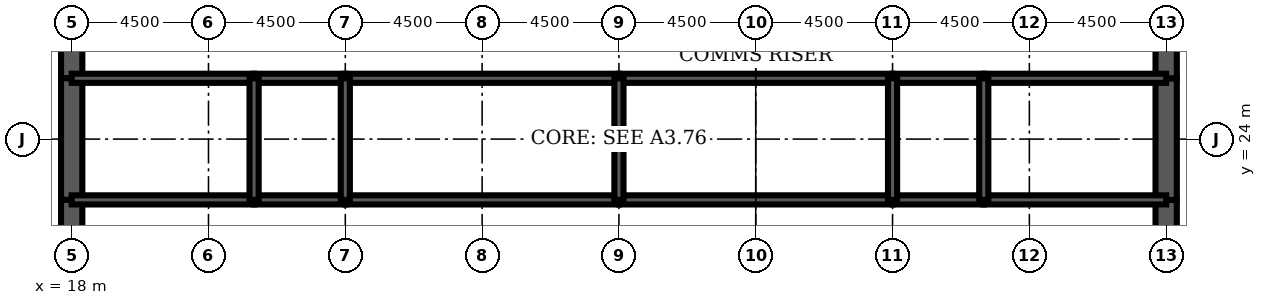
"""IFC4 building model, lengths in metres.
Left out: names, types, materials, properties, quantities, classifications, styles, units other than length and angle.
Written with IfcOpenShell. Run it as: python <this file> out.ifc"""

import sys

from ifc_helpers import new_model, si_unit, direction, frame, frame_2d, origin, place, context, subcontext, project, spatial, rectangle, extrude, element, fill, save


model = new_model("IFC4")
c1 = context("Model", 3, precision=1e-05, world=origin(), true_north=direction((0.0, 1.0)))
c2 = subcontext(c1, "Body", "Model", "MODEL_VIEW")
j1 = project(units=[si_unit("LENGTHUNIT", "METRE"), si_unit("PLANEANGLEUNIT", "RADIAN")], contexts=[c1])
p1 = place(None, origin())
s1 = spatial("IfcSite", under=j1, at=p1, CompositionType="ELEMENT")
p2 = place(p1, origin())
s2 = spatial("IfcBuilding", under=s1, at=p2, CompositionType="ELEMENT")
p3 = place(p2, frame((0.0, 0.0, 325.7)))
s3 = spatial("IfcBuildingStorey", under=s2, at=p3, CompositionType="ELEMENT", Elevation=325.7)
p4 = place(p3, frame((18.0, 28.8, 0.0), z_axis=(0.0, 0.0, 1.0), x_axis=(0.0, -1.0, 0.0)))
e1 = element("IfcWall", 1, at=p4, inside=s3, PredefinedType="SHEAR", context=c2, shape_type="SweptSolid", body=[
    extrude(rectangle(XDim=2.8, YDim=0.7, at=frame_2d((1.4, 0.0))), origin(), (0.0, 0.0, 1.0), 4.2),
])
p5 = place(p4, frame((0.4, 0.0, 0.0)))
e2 = element("IfcOpeningElement", 2, at=p5, cuts=e1, PredefinedType="OPENING", context=c2, shape_type="SweptSolid", body=[
    extrude(rectangle(XDim=1.8, YDim=2.1, at=frame_2d((0.9, 1.05))), frame((0.0, 0.36, 0.0), z_axis=(0.0, -1.0, 0.0), x_axis=(1.0, 0.0, 0.0)), (0.0, 0.0, 1.0), 0.72),
])
p6 = place(p3, frame((18.0, 26.0, 0.0), z_axis=(0.0, 0.0, 1.0), x_axis=(0.0, -1.0, 0.0)))
e3 = element("IfcWall", 3, at=p6, inside=s3, PredefinedType="SHEAR", context=c2, shape_type="SweptSolid", body=[
    extrude(rectangle(XDim=4.0, YDim=0.7, at=frame_2d((2.0, 0.0))), origin(), (0.0, 0.0, 1.0), 4.2),
])
p7 = place(p3, frame((18.0, 22.0, 0.0), z_axis=(0.0, 0.0, 1.0), x_axis=(0.0, -1.0, 0.0)))
e4 = element("IfcWall", 4, at=p7, inside=s3, PredefinedType="SHEAR", context=c2, shape_type="SweptSolid", body=[
    extrude(rectangle(XDim=2.8, YDim=0.7, at=frame_2d((1.4, 0.0))), origin(), (0.0, 0.0, 1.0), 4.2),
])
p8 = place(p7, frame((0.6, 0.0, 0.0)))
e5 = element("IfcOpeningElement", 5, at=p8, cuts=e4, PredefinedType="OPENING", context=c2, shape_type="SweptSolid", body=[
    extrude(rectangle(XDim=1.8, YDim=2.1, at=frame_2d((0.9, 1.05))), frame((0.0, 0.36, 0.0), z_axis=(0.0, -1.0, 0.0), x_axis=(1.0, 0.0, 0.0)), (0.0, 0.0, 1.0), 0.72),
])
p9 = place(p3, frame((54.0, 19.2, 0.0), z_axis=(0.0, 0.0, 1.0), x_axis=(0.0, 1.0, 0.0)))
e6 = element("IfcWall", 6, at=p9, inside=s3, PredefinedType="SHEAR", context=c2, shape_type="SweptSolid", body=[
    extrude(rectangle(XDim=2.8, YDim=0.7, at=frame_2d((1.4, 0.0))), origin(), (0.0, 0.0, 1.0), 4.2),
])
p10 = place(p9, frame((0.4, 0.0, 0.0)))
e7 = element("IfcOpeningElement", 7, at=p10, cuts=e6, PredefinedType="OPENING", context=c2, shape_type="SweptSolid", body=[
    extrude(rectangle(XDim=1.8, YDim=2.1, at=frame_2d((0.9, 1.05))), frame((0.0, 0.36, 0.0), z_axis=(0.0, -1.0, 0.0), x_axis=(1.0, 0.0, 0.0)), (0.0, 0.0, 1.0), 0.72),
])
p11 = place(p3, frame((54.0, 22.0, 0.0), z_axis=(0.0, 0.0, 1.0), x_axis=(0.0, 1.0, 0.0)))
e8 = element("IfcWall", 8, at=p11, inside=s3, PredefinedType="SHEAR", context=c2, shape_type="SweptSolid", body=[
    extrude(rectangle(XDim=4.0, YDim=0.7, at=frame_2d((2.0, 0.0))), origin(), (0.0, 0.0, 1.0), 4.2),
])
p12 = place(p3, frame((54.0, 26.0, 0.0), z_axis=(0.0, 0.0, 1.0), x_axis=(0.0, 1.0, 0.0)))
e9 = element("IfcWall", 9, at=p12, inside=s3, PredefinedType="SHEAR", context=c2, shape_type="SweptSolid", body=[
    extrude(rectangle(XDim=2.8, YDim=0.7, at=frame_2d((1.4, 0.0))), origin(), (0.0, 0.0, 1.0), 4.2),
])
p13 = place(p12, frame((0.6, 0.0, 0.0)))
e10 = element("IfcOpeningElement", 10, at=p13, cuts=e9, PredefinedType="OPENING", context=c2, shape_type="SweptSolid", body=[
    extrude(rectangle(XDim=1.8, YDim=2.1, at=frame_2d((0.9, 1.05))), frame((0.0, 0.36, 0.0), z_axis=(0.0, -1.0, 0.0), x_axis=(1.0, 0.0, 0.0)), (0.0, 0.0, 1.0), 0.72),
])
p14 = place(p3, frame((18.0, 22.0, 0.0), z_axis=(0.0, 0.0, 1.0), x_axis=(1.0, 0.0, 0.0)))
e11 = element("IfcWall", 11, at=p14, inside=s3, PredefinedType="SOLIDWALL", context=c2, shape_type="SweptSolid", body=[
    extrude(rectangle(XDim=6.0, YDim=0.3, at=frame_2d((3.0, 0.0))), origin(), (0.0, 0.0, 1.0), 4.2),
])
p15 = place(p14, frame((4.4, 0.0, 0.0)))
e12 = element("IfcOpeningElement", 12, at=p15, cuts=e11, PredefinedType="OPENING", context=c2, shape_type="SweptSolid", body=[
    extrude(rectangle(XDim=1.0, YDim=2.1, at=frame_2d((0.5, 1.05))), frame((0.0, 0.16, 0.0), z_axis=(0.0, -1.0, 0.0), x_axis=(1.0, 0.0, 0.0)), (0.0, 0.0, 1.0), 0.32),
])
p16 = place(p14, frame((0.75, 0.0, 0.0)))
e13 = element("IfcOpeningElement", 13, at=p16, cuts=e11, PredefinedType="OPENING", context=c2, shape_type="SweptSolid", body=[
    extrude(rectangle(XDim=1.0, YDim=2.1, at=frame_2d((0.5, 1.05))), frame((0.0, 0.16, 0.0), z_axis=(0.0, -1.0, 0.0), x_axis=(1.0, 0.0, 0.0)), (0.0, 0.0, 1.0), 0.32),
])
p17 = place(p3, frame((24.0, 22.0, 0.0), z_axis=(0.0, 0.0, 1.0), x_axis=(1.0, 0.0, 0.0)))
e14 = element("IfcWall", 14, at=p17, inside=s3, PredefinedType="SOLIDWALL", context=c2, shape_type="SweptSolid", body=[
    extrude(rectangle(XDim=3.0, YDim=0.3, at=frame_2d((1.5, 0.0))), origin(), (0.0, 0.0, 1.0), 4.2),
])
p18 = place(p17, frame((1.0, 0.0, 0.0)))
e15 = element("IfcOpeningElement", 15, at=p18, cuts=e14, PredefinedType="OPENING", context=c2, shape_type="SweptSolid", body=[
    extrude(rectangle(XDim=1.0, YDim=2.1, at=frame_2d((0.5, 1.05))), frame((0.0, 0.16, 0.0), z_axis=(0.0, -1.0, 0.0), x_axis=(1.0, 0.0, 0.0)), (0.0, 0.0, 1.0), 0.32),
])
p19 = place(p3, frame((27.0, 22.0, 0.0), z_axis=(0.0, 0.0, 1.0), x_axis=(1.0, 0.0, 0.0)))
e16 = element("IfcWall", 16, at=p19, inside=s3, PredefinedType="SOLIDWALL", context=c2, shape_type="SweptSolid", body=[
    extrude(rectangle(XDim=9.0, YDim=0.3, at=frame_2d((4.5, 0.0))), origin(), (0.0, 0.0, 1.0), 4.2),
])
p20 = place(p19, frame((4.0, 0.0, 0.0)))
e17 = element("IfcOpeningElement", 17, at=p20, cuts=e16, PredefinedType="OPENING", context=c2, shape_type="SweptSolid", body=[
    extrude(rectangle(XDim=1.0, YDim=2.1, at=frame_2d((0.5, 1.05))), frame((0.0, 0.16, 0.0), z_axis=(0.0, -1.0, 0.0), x_axis=(1.0, 0.0, 0.0)), (0.0, 0.0, 1.0), 0.32),
])
p21 = place(p3, frame((36.0, 22.0, 0.0), z_axis=(0.0, 0.0, 1.0), x_axis=(1.0, 0.0, 0.0)))
e18 = element("IfcWall", 18, at=p21, inside=s3, PredefinedType="SOLIDWALL", context=c2, shape_type="SweptSolid", body=[
    extrude(rectangle(XDim=9.0, YDim=0.3, at=frame_2d((4.5, 0.0))), origin(), (0.0, 0.0, 1.0), 4.2),
])
p22 = place(p21, frame((4.0, 0.0, 0.0)))
e19 = element("IfcOpeningElement", 19, at=p22, cuts=e18, PredefinedType="OPENING", context=c2, shape_type="SweptSolid", body=[
    extrude(rectangle(XDim=1.0, YDim=2.1, at=frame_2d((0.5, 1.05))), frame((0.0, 0.16, 0.0), z_axis=(0.0, -1.0, 0.0), x_axis=(1.0, 0.0, 0.0)), (0.0, 0.0, 1.0), 0.32),
])
p23 = place(p3, frame((45.0, 22.0, 0.0), z_axis=(0.0, 0.0, 1.0), x_axis=(1.0, 0.0, 0.0)))
e20 = element("IfcWall", 20, at=p23, inside=s3, PredefinedType="SOLIDWALL", context=c2, shape_type="SweptSolid", body=[
    extrude(rectangle(XDim=3.0, YDim=0.3, at=frame_2d((1.5, 0.0))), origin(), (0.0, 0.0, 1.0), 4.2),
])
p24 = place(p23, frame((1.0, 0.0, 0.0)))
e21 = element("IfcOpeningElement", 21, at=p24, cuts=e20, PredefinedType="OPENING", context=c2, shape_type="SweptSolid", body=[
    extrude(rectangle(XDim=1.0, YDim=2.1, at=frame_2d((0.5, 1.05))), frame((0.0, 0.16, 0.0), z_axis=(0.0, -1.0, 0.0), x_axis=(1.0, 0.0, 0.0)), (0.0, 0.0, 1.0), 0.32),
])
p25 = place(p3, frame((48.0, 22.0, 0.0), z_axis=(0.0, 0.0, 1.0), x_axis=(1.0, 0.0, 0.0)))
e22 = element("IfcWall", 22, at=p25, inside=s3, PredefinedType="SOLIDWALL", context=c2, shape_type="SweptSolid", body=[
    extrude(rectangle(XDim=6.0, YDim=0.3, at=frame_2d((3.0, 0.0))), origin(), (0.0, 0.0, 1.0), 4.2),
])
p26 = place(p25, frame((2.0, 0.0, 0.0)))
e23 = element("IfcOpeningElement", 23, at=p26, cuts=e22, PredefinedType="OPENING", context=c2, shape_type="SweptSolid", body=[
    extrude(rectangle(XDim=1.0, YDim=2.1, at=frame_2d((0.5, 1.05))), frame((0.0, 0.16, 0.0), z_axis=(0.0, -1.0, 0.0), x_axis=(1.0, 0.0, 0.0)), (0.0, 0.0, 1.0), 0.32),
])
p27 = place(p25, frame((4.4, 0.0, 0.0)))
e24 = element("IfcOpeningElement", 24, at=p27, cuts=e22, PredefinedType="OPENING", context=c2, shape_type="SweptSolid", body=[
    extrude(rectangle(XDim=1.0, YDim=2.1, at=frame_2d((0.5, 1.05))), frame((0.0, 0.16, 0.0), z_axis=(0.0, -1.0, 0.0), x_axis=(1.0, 0.0, 0.0)), (0.0, 0.0, 1.0), 0.32),
])
p28 = place(p3, frame((18.0, 26.0, 0.0), z_axis=(0.0, 0.0, 1.0), x_axis=(1.0, 0.0, 0.0)))
e25 = element("IfcWall", 25, at=p28, inside=s3, PredefinedType="SOLIDWALL", context=c2, shape_type="SweptSolid", body=[
    extrude(rectangle(XDim=6.0, YDim=0.3, at=frame_2d((3.0, 0.0))), origin(), (0.0, 0.0, 1.0), 4.2),
])
p29 = place(p3, frame((24.0, 26.0, 0.0), z_axis=(0.0, 0.0, 1.0), x_axis=(1.0, 0.0, 0.0)))
e26 = element("IfcWall", 26, at=p29, inside=s3, PredefinedType="SOLIDWALL", context=c2, shape_type="SweptSolid", body=[
    extrude(rectangle(XDim=3.0, YDim=0.3, at=frame_2d((1.5, 0.0))), origin(), (0.0, 0.0, 1.0), 4.2),
])
for number, where, z_axis, x_axis in (
    (27, (27.0, 26.0, 0.0), (0.0, 0.0, 1.0), (1.0, 0.0, 0.0)),
    (28, (36.0, 26.0, 0.0), (0.0, 0.0, 1.0), (1.0, 0.0, 0.0)),
):
    element("IfcWall", number, at=place(p3, frame(where, z_axis=z_axis, x_axis=x_axis)), inside=s3, PredefinedType="SOLIDWALL", context=c2, shape_type="SweptSolid", body=[
        extrude(rectangle(XDim=9.0, YDim=0.3, at=frame_2d((4.5, 0.0))), origin(), (0.0, 0.0, 1.0), 4.2),
    ])
p30 = place(p3, frame((45.0, 26.0, 0.0), z_axis=(0.0, 0.0, 1.0), x_axis=(1.0, 0.0, 0.0)))
e29 = element("IfcWall", 29, at=p30, inside=s3, PredefinedType="SOLIDWALL", context=c2, shape_type="SweptSolid", body=[
    extrude(rectangle(XDim=3.0, YDim=0.3, at=frame_2d((1.5, 0.0))), origin(), (0.0, 0.0, 1.0), 4.2),
])
p31 = place(p3, frame((48.0, 26.0, 0.0), z_axis=(0.0, 0.0, 1.0), x_axis=(1.0, 0.0, 0.0)))
e30 = element("IfcWall", 30, at=p31, inside=s3, PredefinedType="SOLIDWALL", context=c2, shape_type="SweptSolid", body=[
    extrude(rectangle(XDim=6.0, YDim=0.3, at=frame_2d((3.0, 0.0))), origin(), (0.0, 0.0, 1.0), 4.2),
])
for number, where, z_axis, x_axis in (
    (31, (24.0, 22.0, 0.0), (0.0, 0.0, 1.0), (0.0, 1.0, 0.0)),
    (32, (27.0, 22.0, 0.0), (0.0, 0.0, 1.0), (0.0, 1.0, 0.0)),
    (33, (36.0, 22.0, 0.0), (0.0, 0.0, 1.0), (0.0, 1.0, 0.0)),
    (34, (45.0, 22.0, 0.0), (0.0, 0.0, 1.0), (0.0, 1.0, 0.0)),
    (35, (48.0, 22.0, 0.0), (0.0, 0.0, 1.0), (0.0, 1.0, 0.0)),
):
    element("IfcWall", number, at=place(p3, frame(where, z_axis=z_axis, x_axis=x_axis)), inside=s3, PredefinedType="SOLIDWALL", context=c2, shape_type="SweptSolid", body=[
        extrude(rectangle(XDim=4.0, YDim=0.3, at=frame_2d((2.0, 0.0))), origin(), (0.0, 0.0, 1.0), 4.2),
    ])
p32 = place(p3, frame((42.0, 22.15, 0.0), z_axis=(0.0, 0.0, 1.0), x_axis=(0.0, 1.0, 0.0)))
e36 = element("IfcWall", 36, at=p32, inside=s3, PredefinedType="PARTITIONING", context=c2, shape_type="SweptSolid", body=[
    extrude(rectangle(XDim=3.7, YDim=0.15, at=frame_2d((1.85, 0.0))), origin(), (0.0, 0.0, 1.0), 3.0),
])
p33 = place(p32, frame((2.2, 0.0, 0.0)))
e37 = element("IfcOpeningElement", 37, at=p33, cuts=e36, PredefinedType="OPENING", context=c2, shape_type="SweptSolid", body=[
    extrude(rectangle(XDim=1.0, YDim=2.1, at=frame_2d((0.5, 1.05))), frame((0.0, 0.085, 0.0), z_axis=(0.0, -1.0, 0.0), x_axis=(1.0, 0.0, 0.0)), (0.0, 0.0, 1.0), 0.17),
])
for number, where, z_axis, x_axis in (
    (38, (20.225, 22.15, 0.0), (0.0, 0.0, 1.0), (0.0, 1.0, 0.0)),
    (39, (52.075, 22.15, 0.0), (0.0, 0.0, 1.0), (0.0, 1.0, 0.0)),
):
    element("IfcWall", number, at=place(p3, frame(where, z_axis=z_axis, x_axis=x_axis)), inside=s3, PredefinedType="PARTITIONING", context=c2, shape_type="SweptSolid", body=[
        extrude(rectangle(XDim=3.7, YDim=0.15, at=frame_2d((1.85, 0.0))), origin(), (0.0, 0.0, 1.0), 3.0),
    ])
p34 = place(p33, origin())
e40 = element("IfcDoor", 40, at=p34, inside=s3, OperationType="SINGLE_SWING_RIGHT", PredefinedType="DOOR", context=c2, shape_type="SweptSolid", body=[
    extrude(rectangle(XDim=1.0, YDim=2.1, at=frame_2d((0.5, 1.05))), frame((0.0, 0.025, 0.0), z_axis=(0.0, -1.0, 0.0), x_axis=(1.0, 0.0, 0.0)), (0.0, 0.0, 1.0), 0.05),
])
fill(e37, e40)
p35 = place(p8, origin())
e41 = element("IfcDoor", 41, at=p35, inside=s3, OperationType="SINGLE_SWING_LEFT", PredefinedType="DOOR", context=c2, shape_type="SweptSolid", body=[
    extrude(rectangle(XDim=1.8, YDim=2.1, at=frame_2d((0.9, 1.05))), frame((0.0, 0.35, 0.0), z_axis=(0.0, -1.0, 0.0), x_axis=(1.0, 0.0, 0.0)), (0.0, 0.0, 1.0), 0.699),
])
fill(e5, e41)
p36 = place(p5, origin())
e42 = element("IfcDoor", 42, at=p36, inside=s3, OperationType="SINGLE_SWING_LEFT", PredefinedType="DOOR", context=c2, shape_type="SweptSolid", body=[
    extrude(rectangle(XDim=1.8, YDim=2.1, at=frame_2d((0.9, 1.05))), frame((0.0, 0.35, 0.0), z_axis=(0.0, -1.0, 0.0), x_axis=(1.0, 0.0, 0.0)), (0.0, 0.0, 1.0), 0.699),
])
fill(e2, e42)
p37 = place(p10, origin())
e43 = element("IfcDoor", 43, at=p37, inside=s3, OperationType="SINGLE_SWING_LEFT", PredefinedType="DOOR", context=c2, shape_type="SweptSolid", body=[
    extrude(rectangle(XDim=1.8, YDim=2.1, at=frame_2d((0.9, 1.05))), frame((0.0, 0.35, 0.0), z_axis=(0.0, -1.0, 0.0), x_axis=(1.0, 0.0, 0.0)), (0.0, 0.0, 1.0), 0.699),
])
fill(e7, e43)
p38 = place(p13, origin())
e44 = element("IfcDoor", 44, at=p38, inside=s3, OperationType="SINGLE_SWING_LEFT", PredefinedType="DOOR", context=c2, shape_type="SweptSolid", body=[
    extrude(rectangle(XDim=1.8, YDim=2.1, at=frame_2d((0.9, 1.05))), frame((0.0, 0.35, 0.0), z_axis=(0.0, -1.0, 0.0), x_axis=(1.0, 0.0, 0.0)), (0.0, 0.0, 1.0), 0.699),
])
fill(e10, e44)
p39 = place(p15, origin())
e45 = element("IfcDoor", 45, at=p39, inside=s3, OperationType="SINGLE_SWING_RIGHT", PredefinedType="DOOR", context=c2, shape_type="SweptSolid", body=[
    extrude(rectangle(XDim=1.0, YDim=2.1, at=frame_2d((0.5, 1.05))), frame((0.0, 0.025, 0.0), z_axis=(0.0, -1.0, 0.0), x_axis=(1.0, 0.0, 0.0)), (0.0, 0.0, 1.0), 0.05),
])
fill(e12, e45)
p40 = place(p18, origin())
e46 = element("IfcDoor", 46, at=p40, inside=s3, OperationType="SINGLE_SWING_LEFT", PredefinedType="DOOR", context=c2, shape_type="SweptSolid", body=[
    extrude(rectangle(XDim=1.0, YDim=2.1, at=frame_2d((0.5, 1.05))), frame((0.0, 0.025, 0.0), z_axis=(0.0, -1.0, 0.0), x_axis=(1.0, 0.0, 0.0)), (0.0, 0.0, 1.0), 0.05),
])
fill(e15, e46)
p41 = place(p20, origin())
e47 = element("IfcDoor", 47, at=p41, inside=s3, OperationType="SINGLE_SWING_LEFT", PredefinedType="DOOR", context=c2, shape_type="SweptSolid", body=[
    extrude(rectangle(XDim=1.0, YDim=2.1, at=frame_2d((0.5, 1.05))), frame((0.0, 0.025, 0.0), z_axis=(0.0, -1.0, 0.0), x_axis=(1.0, 0.0, 0.0)), (0.0, 0.0, 1.0), 0.05),
])
fill(e17, e47)
p42 = place(p22, origin())
e48 = element("IfcDoor", 48, at=p42, inside=s3, OperationType="SINGLE_SWING_LEFT", PredefinedType="DOOR", context=c2, shape_type="SweptSolid", body=[
    extrude(rectangle(XDim=1.0, YDim=2.1, at=frame_2d((0.5, 1.05))), frame((0.0, 0.025, 0.0), z_axis=(0.0, -1.0, 0.0), x_axis=(1.0, 0.0, 0.0)), (0.0, 0.0, 1.0), 0.05),
])
fill(e19, e48)
p43 = place(p24, origin())
e49 = element("IfcDoor", 49, at=p43, inside=s3, OperationType="SINGLE_SWING_LEFT", PredefinedType="DOOR", context=c2, shape_type="SweptSolid", body=[
    extrude(rectangle(XDim=1.0, YDim=2.1, at=frame_2d((0.5, 1.05))), frame((0.0, 0.025, 0.0), z_axis=(0.0, -1.0, 0.0), x_axis=(1.0, 0.0, 0.0)), (0.0, 0.0, 1.0), 0.05),
])
fill(e21, e49)
p44 = place(p26, origin())
e50 = element("IfcDoor", 50, at=p44, inside=s3, OperationType="SINGLE_SWING_LEFT", PredefinedType="DOOR", context=c2, shape_type="SweptSolid", body=[
    extrude(rectangle(XDim=1.0, YDim=2.1, at=frame_2d((0.5, 1.05))), frame((0.0, 0.025, 0.0), z_axis=(0.0, -1.0, 0.0), x_axis=(1.0, 0.0, 0.0)), (0.0, 0.0, 1.0), 0.05),
])
fill(e23, e50)
p45 = place(p16, origin())
e51 = element("IfcDoor", 51, at=p45, inside=s3, OperationType="SINGLE_SWING_LEFT", PredefinedType="DOOR", context=c2, shape_type="SweptSolid", body=[
    extrude(rectangle(XDim=1.0, YDim=2.1, at=frame_2d((0.5, 1.05))), frame((0.0, 0.025, 0.0), z_axis=(0.0, -1.0, 0.0), x_axis=(1.0, 0.0, 0.0)), (0.0, 0.0, 1.0), 0.05),
])
fill(e13, e51)
p46 = place(p27, origin())
e52 = element("IfcDoor", 52, at=p46, inside=s3, OperationType="SINGLE_SWING_RIGHT", PredefinedType="DOOR", context=c2, shape_type="SweptSolid", body=[
    extrude(rectangle(XDim=1.0, YDim=2.1, at=frame_2d((0.5, 1.05))), frame((0.0, 0.025, 0.0), z_axis=(0.0, -1.0, 0.0), x_axis=(1.0, 0.0, 0.0)), (0.0, 0.0, 1.0), 0.05),
])
fill(e24, e52)
save(model, sys.argv[1])
